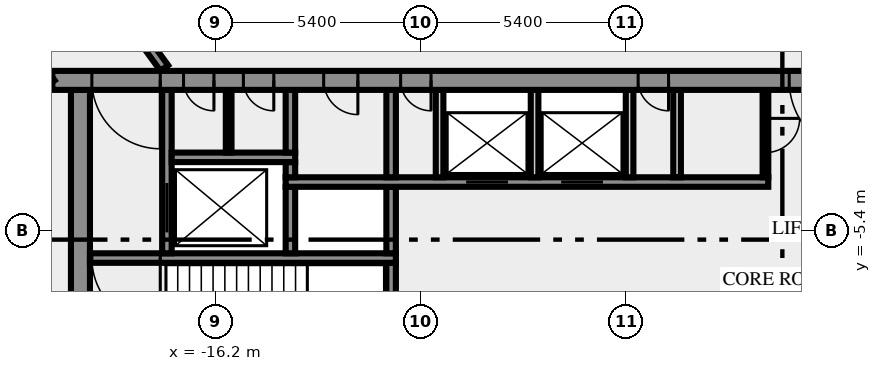
"""IFC4 building model, lengths in metres.
Left out: names, types, materials, properties, quantities, classifications, styles, units other than length and angle.
Written with IfcOpenShell. Run it as: python <this file> out.ifc"""

import sys

from ifc_helpers import new_model, si_unit, direction, frame, frame_2d, origin, place, context, subcontext, project, spatial, rectangle, extrude, element, fill, save


model = new_model("IFC4")
c1 = context("Model", 3, precision=1e-05, world=origin(), true_north=direction((0.0, 1.0)))
c2 = subcontext(c1, "Body", "Model", "MODEL_VIEW")
j1 = project(units=[si_unit("LENGTHUNIT", "METRE"), si_unit("PLANEANGLEUNIT", "RADIAN")], contexts=[c1])
p1 = place(None, origin())
s1 = spatial("IfcSite", under=j1, at=p1, CompositionType="ELEMENT")
p2 = place(p1, origin())
s2 = spatial("IfcBuilding", under=s1, at=p2, CompositionType="ELEMENT")
p3 = place(p2, frame((0.0, 0.0, 297.0)))
s3 = spatial("IfcBuildingStorey", under=s2, at=p3, CompositionType="ELEMENT", Elevation=297.0)
p4 = place(p3, frame((-19.75, -10.5, 0.0), z_axis=(0.0, 0.0, 1.0), x_axis=(0.0, 1.0, 0.0)))
e1 = element("IfcWall", 1, at=p4, inside=s3, PredefinedType="SHEAR", context=c2, shape_type="SweptSolid", body=[
    extrude(rectangle(XDim=8.8, YDim=0.5, at=frame_2d((4.4, 0.0))), origin(), (0.0, 0.0, 1.0), 3.4),
])
p5 = place(p3, frame((-11.575, -7.25, 0.0), z_axis=(0.0, 0.0, 1.0), x_axis=(0.0, 1.0, 0.0)))
e2 = element("IfcWall", 2, at=p5, inside=s3, PredefinedType="SHEAR", context=c2, shape_type="SweptSolid", body=[
    extrude(rectangle(XDim=1.0, YDim=0.25, at=frame_2d((0.5, 0.0))), origin(), (0.0, 0.0, 1.0), 3.4),
])
p6 = place(p3, frame((-11.45, -6.125, 0.0), z_axis=(0.0, 0.0, 1.0), x_axis=(-1.0, 0.0, 0.0)))
e3 = element("IfcWall", 3, at=p6, inside=s3, PredefinedType="SHEAR", context=c2, shape_type="SweptSolid", body=[
    extrude(rectangle(XDim=8.05, YDim=0.25, at=frame_2d((4.025, 0.0))), origin(), (0.0, 0.0, 1.0), 3.4),
])
p7 = place(p6, frame((6.2, 0.0, 0.0)))
e4 = element("IfcOpeningElement", 4, at=p7, cuts=e3, PredefinedType="OPENING", context=c2, shape_type="SweptSolid", body=[
    extrude(rectangle(XDim=1.8, YDim=2.1, at=frame_2d((0.9, 1.05))), frame((0.0, 0.135, 0.0), z_axis=(0.0, -1.0, 0.0), x_axis=(1.0, 0.0, 0.0)), (0.0, 0.0, 1.0), 0.27),
])
p8 = place(p3, frame((-17.475, -6.0, 0.0), z_axis=(0.0, 0.0, 1.0), x_axis=(0.0, 1.0, 0.0)))
e5 = element("IfcWall", 5, at=p8, inside=s3, PredefinedType="SHEAR", context=c2, shape_type="SweptSolid", body=[
    extrude(rectangle(XDim=4.3, YDim=0.25, at=frame_2d((2.15, 0.0))), origin(), (0.0, 0.0, 1.0), 3.4),
])
p9 = place(p8, frame((0.55, 0.0, 0.0)))
e6 = element("IfcOpeningElement", 6, at=p9, cuts=e5, PredefinedType="OPENING", context=c2, shape_type="SweptSolid", body=[
    extrude(rectangle(XDim=1.3, YDim=2.1, at=frame_2d((0.65, 1.05))), frame((0.0, 0.135, 0.0), z_axis=(0.0, -1.0, 0.0), x_axis=(1.0, 0.0, 0.0)), (0.0, 0.0, 1.0), 0.27),
])
for number, where, z_axis, x_axis in (
    (7, (-14.225, -6.0, 0.0), (0.0, 0.0, 1.0), (0.0, 1.0, 0.0)),
    (8, (-11.575, -6.0, 0.0), (0.0, 0.0, 1.0), (0.0, 1.0, 0.0)),
):
    element("IfcWall", number, at=place(p3, frame(where, z_axis=z_axis, x_axis=x_axis)), inside=s3, PredefinedType="SHEAR", context=c2, shape_type="SweptSolid", body=[
        extrude(rectangle(XDim=1.75, YDim=0.25, at=frame_2d((0.875, 0.0))), origin(), (0.0, 0.0, 1.0), 3.4),
    ])
p10 = place(p3, frame((-14.35, -4.125, 0.0), z_axis=(0.0, 0.0, 1.0), x_axis=(1.0, 0.0, 0.0)))
e9 = element("IfcWall", 9, at=p10, inside=s3, PredefinedType="SHEAR", context=c2, shape_type="SweptSolid", body=[
    extrude(rectangle(XDim=12.7, YDim=0.25, at=frame_2d((6.35, 0.0))), origin(), (0.0, 0.0, 1.0), 3.4),
])
p11 = place(p10, frame((4.75, 0.0, 0.0)))
e10 = element("IfcOpeningElement", 10, at=p11, cuts=e9, PredefinedType="OPENING", context=c2, shape_type="SweptSolid", body=[
    extrude(rectangle(XDim=1.1, YDim=2.1, at=frame_2d((0.55, 1.05))), frame((0.0, 0.135, 0.0), z_axis=(0.0, -1.0, 0.0), x_axis=(1.0, 0.0, 0.0)), (0.0, 0.0, 1.0), 0.27),
])
p12 = place(p10, frame((7.25, 0.0, 0.0)))
e11 = element("IfcOpeningElement", 11, at=p12, cuts=e9, PredefinedType="OPENING", context=c2, shape_type="SweptSolid", body=[
    extrude(rectangle(XDim=1.1, YDim=2.1, at=frame_2d((0.55, 1.05))), frame((0.0, 0.135, 0.0), z_axis=(0.0, -1.0, 0.0), x_axis=(1.0, 0.0, 0.0)), (0.0, 0.0, 1.0), 0.27),
])
p13 = place(p3, frame((-14.225, -4.0, 0.0), z_axis=(0.0, 0.0, 1.0), x_axis=(0.0, 1.0, 0.0)))
e12 = element("IfcWall", 12, at=p13, inside=s3, PredefinedType="SHEAR", context=c2, shape_type="SweptSolid", body=[
    extrude(rectangle(XDim=0.4, YDim=0.25, at=frame_2d((0.2, 0.0))), origin(), (0.0, 0.0, 1.0), 3.4),
])
p14 = place(p3, frame((-11.575, -4.0, 0.0), z_axis=(0.0, 0.0, 1.0), x_axis=(0.0, 1.0, 0.0)))
e13 = element("IfcWall", 13, at=p14, inside=s3, PredefinedType="SHEAR", context=c2, shape_type="SweptSolid", body=[
    extrude(rectangle(XDim=2.3, YDim=0.25, at=frame_2d((1.15, 0.0))), origin(), (0.0, 0.0, 1.0), 3.4),
])
for number, where, z_axis, x_axis in (
    (14, (-10.3, -4.0, 0.0), (0.0, 0.0, 1.0), (0.0, 1.0, 0.0)),
    (15, (-7.8, -4.0, 0.0), (0.0, 0.0, 1.0), (0.0, 1.0, 0.0)),
    (16, (-5.3, -4.0, 0.0), (0.0, 0.0, 1.0), (0.0, 1.0, 0.0)),
    (17, (-4.05, -4.0, 0.0), (0.0, 0.0, 1.0), (0.0, 1.0, 0.0)),
):
    element("IfcWall", number, at=place(p3, frame(where, z_axis=z_axis, x_axis=x_axis)), inside=s3, PredefinedType="SOLIDWALL", context=c2, shape_type="SweptSolid", body=[
        extrude(rectangle(XDim=2.3, YDim=0.2, at=frame_2d((1.15, 0.0))), origin(), (0.0, 0.0, 1.0), 3.4),
    ])
p15 = place(p3, frame((-1.725, -1.7, 0.0), z_axis=(0.0, 0.0, 1.0), x_axis=(0.0, -1.0, 0.0)))
e18 = element("IfcWall", 18, at=p15, inside=s3, PredefinedType="PARTITIONING", context=c2, shape_type="SweptSolid", body=[
    extrude(rectangle(XDim=2.3, YDim=0.15, at=frame_2d((1.15, 0.0))), origin(), (0.0, 0.0, 1.0), 3.4),
])
p16 = place(p15, frame((0.75, 0.0, 0.0)))
e19 = element("IfcOpeningElement", 19, at=p16, cuts=e18, PredefinedType="OPENING", context=c2, shape_type="SweptSolid", body=[
    extrude(rectangle(XDim=0.9, YDim=2.1, at=frame_2d((0.45, 1.05))), frame((0.0, 0.085, 0.0), z_axis=(0.0, -1.0, 0.0), x_axis=(1.0, 0.0, 0.0)), (0.0, 0.0, 1.0), 0.17),
])
p17 = place(p3, frame((-17.35, -3.475, 0.0), z_axis=(0.0, 0.0, 1.0), x_axis=(1.0, 0.0, 0.0)))
e20 = element("IfcWall", 20, at=p17, inside=s3, PredefinedType="SHEAR", context=c2, shape_type="SweptSolid", body=[
    extrude(rectangle(XDim=3.25, YDim=0.25, at=frame_2d((1.625, 0.0))), origin(), (0.0, 0.0, 1.0), 3.4),
])
p18 = place(p3, frame((-15.85, -3.35, 0.0), z_axis=(0.0, 0.0, 1.0), x_axis=(0.0, 1.0, 0.0)))
e21 = element("IfcWall", 21, at=p18, inside=s3, PredefinedType="PARTITIONING", context=c2, shape_type="SweptSolid", body=[
    extrude(rectangle(XDim=1.65, YDim=0.15, at=frame_2d((0.825, 0.0))), origin(), (0.0, 0.0, 1.0), 3.4),
])
p19 = place(p3, frame((-14.225, -3.35, 0.0), z_axis=(0.0, 0.0, 1.0), x_axis=(0.0, 1.0, 0.0)))
e22 = element("IfcWall", 22, at=p19, inside=s3, PredefinedType="SHEAR", context=c2, shape_type="SweptSolid", body=[
    extrude(rectangle(XDim=1.65, YDim=0.25, at=frame_2d((0.825, 0.0))), origin(), (0.0, 0.0, 1.0), 3.4),
])
p20 = place(p3, frame((20.49, -1.45, 0.0), z_axis=(0.0, 0.0, 1.0), x_axis=(-1.0, 0.0, 0.0)))
e23 = element("IfcWall", 23, at=p20, inside=s3, PredefinedType="SHEAR", context=c2, shape_type="SweptSolid", body=[
    extrude(rectangle(XDim=40.98, YDim=0.5, at=frame_2d((20.49, 0.0))), origin(), (0.0, 0.0, 1.0), 3.4),
])
p21 = place(p20, frame((38.14, 0.0, 0.0)))
e24 = element("IfcOpeningElement", 24, at=p21, cuts=e23, PredefinedType="OPENING", context=c2, shape_type="SweptSolid", body=[
    extrude(rectangle(XDim=1.8, YDim=2.1, at=frame_2d((0.9, 1.05))), frame((0.0, 0.26, 0.0), z_axis=(0.0, -1.0, 0.0), x_axis=(1.0, 0.0, 0.0)), (0.0, 0.0, 1.0), 0.52),
])
p22 = place(p20, frame((36.728, 0.0, 0.0)))
e25 = element("IfcOpeningElement", 25, at=p22, cuts=e23, PredefinedType="OPENING", context=c2, shape_type="SweptSolid", body=[
    extrude(rectangle(XDim=0.8, YDim=2.1, at=frame_2d((0.4, 1.05))), frame((0.0, 0.26, 0.0), z_axis=(0.0, -1.0, 0.0), x_axis=(1.0, 0.0, 0.0)), (0.0, 0.0, 1.0), 0.52),
])
p23 = place(p20, frame((35.153, 0.0, 0.0)))
e26 = element("IfcOpeningElement", 26, at=p23, cuts=e23, PredefinedType="OPENING", context=c2, shape_type="SweptSolid", body=[
    extrude(rectangle(XDim=0.8, YDim=2.1, at=frame_2d((0.4, 1.05))), frame((0.0, 0.26, 0.0), z_axis=(0.0, -1.0, 0.0), x_axis=(1.0, 0.0, 0.0)), (0.0, 0.0, 1.0), 0.52),
])
p24 = place(p20, frame((32.94, 0.0, 0.0)))
e27 = element("IfcOpeningElement", 27, at=p24, cuts=e23, PredefinedType="OPENING", context=c2, shape_type="SweptSolid", body=[
    extrude(rectangle(XDim=0.9, YDim=2.1, at=frame_2d((0.45, 1.05))), frame((0.0, 0.26, 0.0), z_axis=(0.0, -1.0, 0.0), x_axis=(1.0, 0.0, 0.0)), (0.0, 0.0, 1.0), 0.52),
])
p25 = place(p20, frame((31.015, 0.0, 0.0)))
e28 = element("IfcOpeningElement", 28, at=p25, cuts=e23, PredefinedType="OPENING", context=c2, shape_type="SweptSolid", body=[
    extrude(rectangle(XDim=0.8, YDim=2.1, at=frame_2d((0.4, 1.05))), frame((0.0, 0.26, 0.0), z_axis=(0.0, -1.0, 0.0), x_axis=(1.0, 0.0, 0.0)), (0.0, 0.0, 1.0), 0.52),
])
p26 = place(p20, frame((24.765, 0.0, 0.0)))
e29 = element("IfcOpeningElement", 29, at=p26, cuts=e23, PredefinedType="OPENING", context=c2, shape_type="SweptSolid", body=[
    extrude(rectangle(XDim=0.8, YDim=2.1, at=frame_2d((0.4, 1.05))), frame((0.0, 0.26, 0.0), z_axis=(0.0, -1.0, 0.0), x_axis=(1.0, 0.0, 0.0)), (0.0, 0.0, 1.0), 0.52),
])
p27 = place(p20, frame((19.59, 0.0, 0.0)))
e30 = element("IfcOpeningElement", 30, at=p27, cuts=e23, PredefinedType="OPENING", context=c2, shape_type="SweptSolid", body=[
    extrude(rectangle(XDim=2.0, YDim=2.1, at=frame_2d((1.0, 1.05))), frame((0.0, 0.26, 0.0), z_axis=(0.0, -1.0, 0.0), x_axis=(1.0, 0.0, 0.0)), (0.0, 0.0, 1.0), 0.52),
])
p28 = place(p20, frame((14.202, 0.0, 0.0)))
e31 = element("IfcOpeningElement", 31, at=p28, cuts=e23, PredefinedType="OPENING", context=c2, shape_type="SweptSolid", body=[
    extrude(rectangle(XDim=0.9, YDim=2.1, at=frame_2d((0.45, 1.05))), frame((0.0, 0.26, 0.0), z_axis=(0.0, -1.0, 0.0), x_axis=(1.0, 0.0, 0.0)), (0.0, 0.0, 1.0), 0.52),
])
p29 = place(p20, frame((10.478, 0.0, 0.0)))
e32 = element("IfcOpeningElement", 32, at=p29, cuts=e23, PredefinedType="OPENING", context=c2, shape_type="SweptSolid", body=[
    extrude(rectangle(XDim=0.9, YDim=2.1, at=frame_2d((0.45, 1.05))), frame((0.0, 0.26, 0.0), z_axis=(0.0, -1.0, 0.0), x_axis=(1.0, 0.0, 0.0)), (0.0, 0.0, 1.0), 0.52),
])
p30 = place(p20, frame((7.14, 0.0, 0.0)))
e33 = element("IfcOpeningElement", 33, at=p30, cuts=e23, PredefinedType="OPENING", context=c2, shape_type="SweptSolid", body=[
    extrude(rectangle(XDim=0.9, YDim=2.1, at=frame_2d((0.45, 1.05))), frame((0.0, 0.26, 0.0), z_axis=(0.0, -1.0, 0.0), x_axis=(1.0, 0.0, 0.0)), (0.0, 0.0, 1.0), 0.52),
])
p31 = place(p20, frame((4.19, 0.0, 0.0)))
e34 = element("IfcOpeningElement", 34, at=p31, cuts=e23, PredefinedType="OPENING", context=c2, shape_type="SweptSolid", body=[
    extrude(rectangle(XDim=0.9, YDim=2.1, at=frame_2d((0.45, 1.05))), frame((0.0, 0.26, 0.0), z_axis=(0.0, -1.0, 0.0), x_axis=(1.0, 0.0, 0.0)), (0.0, 0.0, 1.0), 0.52),
])
p32 = place(p20, frame((1.04, 0.0, 0.0)))
e35 = element("IfcOpeningElement", 35, at=p32, cuts=e23, PredefinedType="OPENING", context=c2, shape_type="SweptSolid", body=[
    extrude(rectangle(XDim=1.8, YDim=2.1, at=frame_2d((0.9, 1.05))), frame((0.0, 0.26, 0.0), z_axis=(0.0, -1.0, 0.0), x_axis=(1.0, 0.0, 0.0)), (0.0, 0.0, 1.0), 0.52),
])
p33 = place(p3, frame((-20.531, -1.523, 0.0), z_axis=(0.0, 0.0, 1.0), x_axis=(-0.587785867777, 0.809016547199, 0.0)))
e36 = element("IfcWall", 36, at=p33, inside=s3, PredefinedType="SOLIDWALL", context=c2, shape_type="SweptSolid", body=[
    extrude(rectangle(XDim=16.67, YDim=0.25, at=frame_2d((8.335, 0.0))), origin(), (0.0, 0.0, 1.0), 3.4),
])
p34 = place(p33, frame((6.216, 0.0, 0.0)))
e37 = element("IfcOpeningElement", 37, at=p34, cuts=e36, PredefinedType="OPENING", context=c2, shape_type="SweptSolid", body=[
    extrude(rectangle(XDim=0.9, YDim=2.1, at=frame_2d((0.45, 1.05))), frame((0.0, 0.135, 0.0), z_axis=(0.0, -1.0, 0.0), x_axis=(1.0, 0.0, 0.0)), (0.0, 0.0, 1.0), 0.27),
])
p35 = place(p33, frame((7.816, 0.0, 0.0)))
e38 = element("IfcOpeningElement", 38, at=p35, cuts=e36, PredefinedType="OPENING", context=c2, shape_type="SweptSolid", body=[
    extrude(rectangle(XDim=0.9, YDim=2.1, at=frame_2d((0.45, 1.05))), frame((0.0, 0.135, 0.0), z_axis=(0.0, -1.0, 0.0), x_axis=(1.0, 0.0, 0.0)), (0.0, 0.0, 1.0), 0.27),
])
p36 = place(p3, frame((-28.039, 13.319, 0.0), z_axis=(0.0, 0.0, 1.0), x_axis=(0.587791911753, -0.809012155952, 0.0)))
e39 = element("IfcWall", 39, at=p36, inside=s3, PredefinedType="SOLIDWALL", context=c2, shape_type="SweptSolid", body=[
    extrude(rectangle(XDim=17.853, YDim=0.25, at=frame_2d((8.927, 0.0))), origin(), (0.0, 0.0, 1.0), 3.4),
])
p37 = place(p36, frame((0.225, 0.0, 0.0)))
e40 = element("IfcOpeningElement", 40, at=p37, cuts=e39, PredefinedType="OPENING", context=c2, shape_type="SweptSolid", body=[
    extrude(rectangle(XDim=0.9, YDim=2.1, at=frame_2d((0.45, 1.05))), frame((0.0, 0.135, 0.0), z_axis=(0.0, -1.0, 0.0), x_axis=(1.0, 0.0, 0.0)), (0.0, 0.0, 1.0), 0.27),
])
p38 = place(p7, origin())
e41 = element("IfcDoor", 41, at=p38, inside=s3, OperationType="DOUBLE_DOOR_SINGLE_SWING", PredefinedType="DOOR", context=c2, shape_type="SweptSolid", body=[
    extrude(rectangle(XDim=1.8, YDim=2.1, at=frame_2d((0.9, 1.05))), frame((0.0, 0.025, 0.0), z_axis=(0.0, -1.0, 0.0), x_axis=(1.0, 0.0, 0.0)), (0.0, 0.0, 1.0), 0.05),
])
fill(e4, e41)
p39 = place(p9, origin())
e42 = element("IfcDoor", 42, at=p39, inside=s3, OperationType="DOUBLE_DOOR_SLIDING", PredefinedType="DOOR", context=c2, shape_type="SweptSolid", body=[
    extrude(rectangle(XDim=1.3, YDim=2.1, at=frame_2d((0.65, 1.05))), frame((0.0, 0.025, 0.0), z_axis=(0.0, -1.0, 0.0), x_axis=(1.0, 0.0, 0.0)), (0.0, 0.0, 1.0), 0.05),
])
fill(e6, e42)
p40 = place(p11, origin())
e43 = element("IfcDoor", 43, at=p40, inside=s3, OperationType="DOUBLE_DOOR_SLIDING", PredefinedType="DOOR", context=c2, shape_type="SweptSolid", body=[
    extrude(rectangle(XDim=1.1, YDim=2.1, at=frame_2d((0.55, 1.05))), frame((0.0, 0.025, 0.0), z_axis=(0.0, -1.0, 0.0), x_axis=(1.0, 0.0, 0.0)), (0.0, 0.0, 1.0), 0.05),
])
fill(e10, e43)
p41 = place(p12, origin())
e44 = element("IfcDoor", 44, at=p41, inside=s3, OperationType="DOUBLE_DOOR_SLIDING", PredefinedType="DOOR", context=c2, shape_type="SweptSolid", body=[
    extrude(rectangle(XDim=1.1, YDim=2.1, at=frame_2d((0.55, 1.05))), frame((0.0, 0.025, 0.0), z_axis=(0.0, -1.0, 0.0), x_axis=(1.0, 0.0, 0.0)), (0.0, 0.0, 1.0), 0.05),
])
fill(e11, e44)
p42 = place(p16, origin())
e45 = element("IfcDoor", 45, at=p42, inside=s3, OperationType="SINGLE_SWING_RIGHT", PredefinedType="DOOR", context=c2, shape_type="SweptSolid", body=[
    extrude(rectangle(XDim=0.9, YDim=2.1, at=frame_2d((0.45, 1.05))), frame((0.0, 0.025, 0.0), z_axis=(0.0, -1.0, 0.0), x_axis=(1.0, 0.0, 0.0)), (0.0, 0.0, 1.0), 0.05),
])
fill(e19, e45)
p43 = place(p21, origin())
e46 = element("IfcDoor", 46, at=p43, inside=s3, OperationType="DOUBLE_DOOR_SINGLE_SWING", PredefinedType="DOOR", context=c2, shape_type="SweptSolid", body=[
    extrude(rectangle(XDim=1.8, YDim=2.1, at=frame_2d((0.9, 1.05))), frame((0.0, 0.025, 0.0), z_axis=(0.0, -1.0, 0.0), x_axis=(1.0, 0.0, 0.0)), (0.0, 0.0, 1.0), 0.05),
])
fill(e24, e46)
p44 = place(p22, origin())
e47 = element("IfcDoor", 47, at=p44, inside=s3, OperationType="SINGLE_SWING_RIGHT", PredefinedType="DOOR", context=c2, shape_type="SweptSolid", body=[
    extrude(rectangle(XDim=0.8, YDim=2.1, at=frame_2d((0.4, 1.05))), frame((0.0, 0.025, 0.0), z_axis=(0.0, -1.0, 0.0), x_axis=(1.0, 0.0, 0.0)), (0.0, 0.0, 1.0), 0.05),
])
fill(e25, e47)
p45 = place(p23, origin())
e48 = element("IfcDoor", 48, at=p45, inside=s3, OperationType="SINGLE_SWING_RIGHT", PredefinedType="DOOR", context=c2, shape_type="SweptSolid", body=[
    extrude(rectangle(XDim=0.8, YDim=2.1, at=frame_2d((0.4, 1.05))), frame((0.0, 0.025, 0.0), z_axis=(0.0, -1.0, 0.0), x_axis=(1.0, 0.0, 0.0)), (0.0, 0.0, 1.0), 0.05),
])
fill(e26, e48)
p46 = place(p24, origin())
e49 = element("IfcDoor", 49, at=p46, inside=s3, OperationType="SINGLE_SWING_RIGHT", PredefinedType="DOOR", context=c2, shape_type="SweptSolid", body=[
    extrude(rectangle(XDim=0.9, YDim=2.1, at=frame_2d((0.45, 1.05))), frame((0.0, 0.025, 0.0), z_axis=(0.0, -1.0, 0.0), x_axis=(1.0, 0.0, 0.0)), (0.0, 0.0, 1.0), 0.05),
])
fill(e27, e49)
p47 = place(p25, origin())
e50 = element("IfcDoor", 50, at=p47, inside=s3, OperationType="SINGLE_SWING_RIGHT", PredefinedType="DOOR", context=c2, shape_type="SweptSolid", body=[
    extrude(rectangle(XDim=0.8, YDim=2.1, at=frame_2d((0.4, 1.05))), frame((0.0, 0.025, 0.0), z_axis=(0.0, -1.0, 0.0), x_axis=(1.0, 0.0, 0.0)), (0.0, 0.0, 1.0), 0.05),
])
fill(e28, e50)
p48 = place(p26, origin())
e51 = element("IfcDoor", 51, at=p48, inside=s3, OperationType="SINGLE_SWING_RIGHT", PredefinedType="DOOR", context=c2, shape_type="SweptSolid", body=[
    extrude(rectangle(XDim=0.8, YDim=2.1, at=frame_2d((0.4, 1.05))), frame((0.0, 0.025, 0.0), z_axis=(0.0, -1.0, 0.0), x_axis=(1.0, 0.0, 0.0)), (0.0, 0.0, 1.0), 0.05),
])
fill(e29, e51)
p49 = place(p27, origin())
e52 = element("IfcDoor", 52, at=p49, inside=s3, OperationType="DOUBLE_DOOR_SINGLE_SWING", PredefinedType="DOOR", context=c2, shape_type="SweptSolid", body=[
    extrude(rectangle(XDim=2.0, YDim=2.1, at=frame_2d((1.0, 1.05))), frame((0.0, 0.025, 0.0), z_axis=(0.0, -1.0, 0.0), x_axis=(1.0, 0.0, 0.0)), (0.0, 0.0, 1.0), 0.05),
])
fill(e30, e52)
save(model, sys.argv[1])
